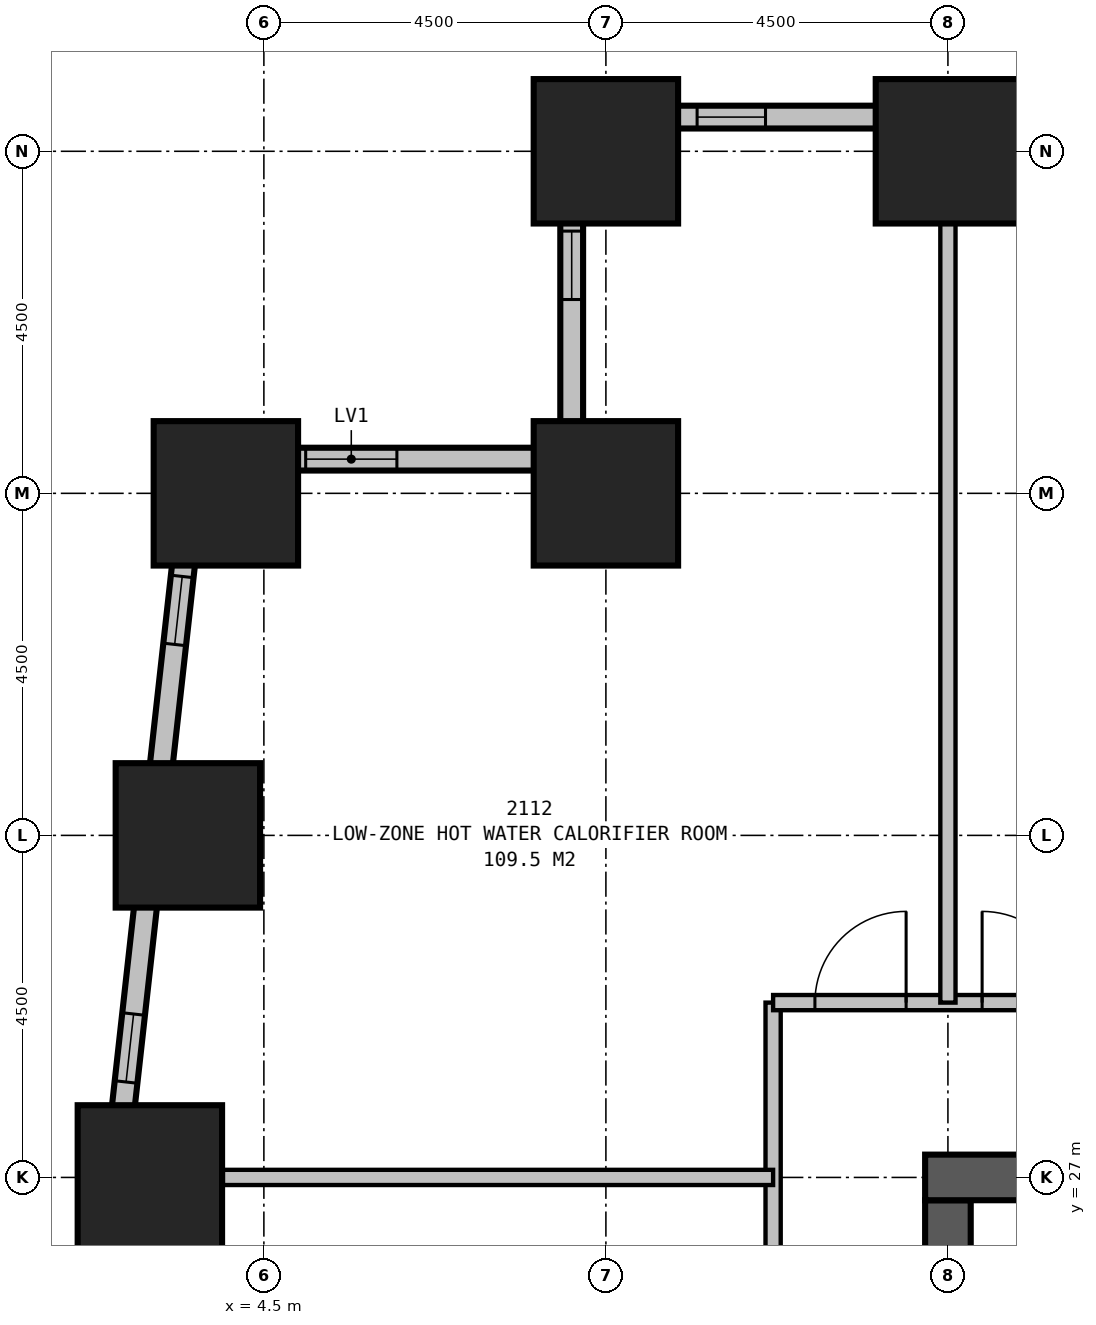
"""IFC4 building model, lengths in metres.
Left out: names, types, materials, properties, quantities, classifications, styles, units other than length and angle.
Written with IfcOpenShell. Run it as: python <this file> out.ifc"""

import sys

from ifc_helpers import new_model, si_unit, direction, frame, frame_2d, origin, origin_2d, place, context, subcontext, project, spatial, rectangle, extrude, element, fill, save


model = new_model("IFC4")
c1 = context("Model", 3, precision=1e-05, world=origin(), true_north=direction((0.0, 1.0)))
c2 = subcontext(c1, "Body", "Model", "MODEL_VIEW")
j1 = project(units=[si_unit("LENGTHUNIT", "METRE"), si_unit("PLANEANGLEUNIT", "RADIAN")], contexts=[c1])
p1 = place(None, origin())
s1 = spatial("IfcSite", under=j1, at=p1, CompositionType="ELEMENT")
p2 = place(p1, origin())
s2 = spatial("IfcBuilding", under=s1, at=p2, CompositionType="ELEMENT")
p3 = place(p2, frame((0.0, 0.0, 85.7)))
s3 = spatial("IfcBuildingStorey", under=s2, at=p3, CompositionType="ELEMENT", Elevation=85.7)
for number, where, z_axis, x_axis in (
    (1, (13.5, 40.5, 0.0), (0.0, 0.0, 1.0), (1.0, 0.0, 0.0)),
    (2, (9.0, 40.5, 0.0), (0.0, 0.0, 1.0), (1.0, 0.0, 0.0)),
    (3, (9.0, 36.0, 0.0), (0.0, 0.0, 1.0), (1.0, 0.0, 0.0)),
    (4, (4.0, 36.0, 0.0), (0.0, 0.0, 1.0), (1.0, 0.0, 0.0)),
    (5, (3.5, 31.5, 0.0), (0.0, 0.0, 1.0), (1.0, 0.0, 0.0)),
    (6, (3.0, 27.0, 0.0), (0.0, 0.0, 1.0), (1.0, 0.0, 0.0)),
):
    element("IfcColumn", number, at=place(p3, frame(where, z_axis=z_axis, x_axis=x_axis)), inside=s3, PredefinedType="COLUMN", context=c2, shape_type="SweptSolid", body=[
        extrude(rectangle(XDim=1.9, YDim=1.9, at=origin_2d()), origin(), (0.0, 0.0, 1.0), 4.2),
    ])
p4 = place(p3, frame((36.3, 27.0, 0.0), z_axis=(0.0, 0.0, 1.0), x_axis=(-1.0, 0.0, 0.0)))
e7 = element("IfcWall", 7, at=p4, inside=s3, PredefinedType="SHEAR", context=c2, shape_type="SweptSolid", body=[
    extrude(rectangle(XDim=23.1, YDim=0.6, at=frame_2d((11.55, 0.0))), origin(), (0.0, 0.0, 1.0), 4.2),
])
p5 = place(p4, frame((17.05, 0.0, 0.0)))
e8 = element("IfcOpeningElement", 8, at=p5, cuts=e7, PredefinedType="OPENING", context=c2, shape_type="SweptSolid", body=[
    extrude(rectangle(XDim=1.0, YDim=2.1, at=frame_2d((0.5, 1.05))), frame((0.0, 0.31, 0.0), z_axis=(0.0, -1.0, 0.0), x_axis=(1.0, 0.0, 0.0)), (0.0, 0.0, 1.0), 0.62),
])
p6 = place(p4, frame((12.05, 0.0, 0.0)))
e9 = element("IfcOpeningElement", 9, at=p6, cuts=e7, PredefinedType="OPENING", context=c2, shape_type="SweptSolid", body=[
    extrude(rectangle(XDim=1.0, YDim=2.1, at=frame_2d((0.5, 1.05))), frame((0.0, 0.31, 0.0), z_axis=(0.0, -1.0, 0.0), x_axis=(1.0, 0.0, 0.0)), (0.0, 0.0, 1.0), 0.62),
])
p7 = place(p4, frame((7.05, 0.0, 0.0)))
e10 = element("IfcOpeningElement", 10, at=p7, cuts=e7, PredefinedType="OPENING", context=c2, shape_type="SweptSolid", body=[
    extrude(rectangle(XDim=1.0, YDim=2.1, at=frame_2d((0.5, 1.05))), frame((0.0, 0.31, 0.0), z_axis=(0.0, -1.0, 0.0), x_axis=(1.0, 0.0, 0.0)), (0.0, 0.0, 1.0), 0.62),
])
p8 = place(p3, frame((13.5, 26.7, 0.0), z_axis=(0.0, 0.0, 1.0), x_axis=(0.0, -1.0, 0.0)))
e11 = element("IfcWall", 11, at=p8, inside=s3, PredefinedType="SHEAR", context=c2, shape_type="SweptSolid", body=[
    extrude(rectangle(XDim=6.7, YDim=0.6, at=frame_2d((3.35, 0.0))), origin(), (0.0, 0.0, 1.0), 4.2),
])
p9 = place(p3, frame((41.1, 40.95, 0.0), z_axis=(0.0, 0.0, 1.0), x_axis=(-1.0, 0.0, 0.0)))
e12 = element("IfcWall", 12, at=p9, inside=s3, PredefinedType="STANDARD", context=c2, shape_type="SweptSolid", body=[
    extrude(rectangle(XDim=32.7, YDim=0.3, at=frame_2d((16.35, 0.0))), origin(), (0.0, 0.0, 1.0), 2.85),
])
p10 = place(p9, frame((3.0, 0.0, 0.5)))
e13 = element("IfcOpeningElement", 13, at=p10, cuts=e12, PredefinedType="OPENING", context=c2, shape_type="SweptSolid", body=[
    extrude(rectangle(XDim=0.9, YDim=1.2, at=frame_2d((0.45, 0.6))), frame((0.0, 0.16, 0.0), z_axis=(0.0, -1.0, 0.0), x_axis=(1.0, 0.0, 0.0)), (0.0, 0.0, 1.0), 0.32),
])
p11 = place(p9, frame((6.15, 0.0, 0.5)))
e14 = element("IfcOpeningElement", 14, at=p11, cuts=e12, PredefinedType="OPENING", context=c2, shape_type="SweptSolid", body=[
    extrude(rectangle(XDim=0.9, YDim=1.2, at=frame_2d((0.45, 0.6))), frame((0.0, 0.16, 0.0), z_axis=(0.0, -1.0, 0.0), x_axis=(1.0, 0.0, 0.0)), (0.0, 0.0, 1.0), 0.32),
])
p12 = place(p9, frame((12.0, 0.0, 0.5)))
e15 = element("IfcOpeningElement", 15, at=p12, cuts=e12, PredefinedType="OPENING", context=c2, shape_type="SweptSolid", body=[
    extrude(rectangle(XDim=0.9, YDim=1.2, at=frame_2d((0.45, 0.6))), frame((0.0, 0.16, 0.0), z_axis=(0.0, -1.0, 0.0), x_axis=(1.0, 0.0, 0.0)), (0.0, 0.0, 1.0), 0.32),
])
p13 = place(p9, frame((15.15, 0.0, 0.5)))
e16 = element("IfcOpeningElement", 16, at=p13, cuts=e12, PredefinedType="OPENING", context=c2, shape_type="SweptSolid", body=[
    extrude(rectangle(XDim=0.9, YDim=1.2, at=frame_2d((0.45, 0.6))), frame((0.0, 0.16, 0.0), z_axis=(0.0, -1.0, 0.0), x_axis=(1.0, 0.0, 0.0)), (0.0, 0.0, 1.0), 0.32),
])
p14 = place(p9, frame((21.0, 0.0, 0.5)))
e17 = element("IfcOpeningElement", 17, at=p14, cuts=e12, PredefinedType="OPENING", context=c2, shape_type="SweptSolid", body=[
    extrude(rectangle(XDim=0.9, YDim=1.2, at=frame_2d((0.45, 0.6))), frame((0.0, 0.16, 0.0), z_axis=(0.0, -1.0, 0.0), x_axis=(1.0, 0.0, 0.0)), (0.0, 0.0, 1.0), 0.32),
])
p15 = place(p9, frame((24.2, 0.0, 0.5)))
e18 = element("IfcOpeningElement", 18, at=p15, cuts=e12, PredefinedType="OPENING", context=c2, shape_type="SweptSolid", body=[
    extrude(rectangle(XDim=0.9, YDim=1.2, at=frame_2d((0.45, 0.6))), frame((0.0, 0.16, 0.0), z_axis=(0.0, -1.0, 0.0), x_axis=(1.0, 0.0, 0.0)), (0.0, 0.0, 1.0), 0.32),
])
p16 = place(p9, frame((30.0, 0.0, 0.5)))
e19 = element("IfcOpeningElement", 19, at=p16, cuts=e12, PredefinedType="OPENING", context=c2, shape_type="SweptSolid", body=[
    extrude(rectangle(XDim=0.9, YDim=1.2, at=frame_2d((0.45, 0.6))), frame((0.0, 0.16, 0.0), z_axis=(0.0, -1.0, 0.0), x_axis=(1.0, 0.0, 0.0)), (0.0, 0.0, 1.0), 0.32),
])
p17 = place(p3, frame((8.55, 41.1, 0.0), z_axis=(0.0, 0.0, 1.0), x_axis=(0.0, -1.0, 0.0)))
e20 = element("IfcWall", 20, at=p17, inside=s3, PredefinedType="STANDARD", context=c2, shape_type="SweptSolid", body=[
    extrude(rectangle(XDim=4.8, YDim=0.3, at=frame_2d((2.4, 0.0))), origin(), (0.0, 0.0, 1.0), 2.85),
])
p18 = place(p17, frame((1.65, 0.0, 0.5)))
e21 = element("IfcOpeningElement", 21, at=p18, cuts=e20, PredefinedType="OPENING", context=c2, shape_type="SweptSolid", body=[
    extrude(rectangle(XDim=0.9, YDim=1.2, at=frame_2d((0.45, 0.6))), frame((0.0, 0.16, 0.0), z_axis=(0.0, -1.0, 0.0), x_axis=(1.0, 0.0, 0.0)), (0.0, 0.0, 1.0), 0.32),
])
p19 = place(p3, frame((8.7, 36.45, 0.0), z_axis=(0.0, 0.0, 1.0), x_axis=(-1.0, 0.0, 0.0)))
e22 = element("IfcWall", 22, at=p19, inside=s3, PredefinedType="STANDARD", context=c2, shape_type="SweptSolid", body=[
    extrude(rectangle(XDim=5.253, YDim=0.3, at=frame_2d((2.626, 0.0))), origin(), (0.0, 0.0, 1.0), 2.85),
])
p20 = place(p19, frame((2.45, 0.0, 0.3)))
e23 = element("IfcOpeningElement", 23, at=p20, cuts=e22, PredefinedType="OPENING", context=c2, shape_type="SweptSolid", body=[
    extrude(rectangle(XDim=1.2, YDim=1.5, at=frame_2d((0.6, 0.75))), frame((0.0, 0.16, 0.0), z_axis=(0.0, -1.0, 0.0), x_axis=(1.0, 0.0, 0.0)), (0.0, 0.0, 1.0), 0.32),
])
p21 = place(p3, frame((3.614, 36.599, 0.0), z_axis=(0.0, 0.0, 1.0), x_axis=(-0.110429082637, -0.993884006164, 0.0)))
e24 = element("IfcWall", 24, at=p21, inside=s3, PredefinedType="STANDARD", context=c2, shape_type="SweptSolid", body=[
    extrude(rectangle(XDim=32.899, YDim=0.3, at=frame_2d((16.45, 0.0))), origin(), (0.0, 0.0, 1.0), 2.85),
])
p22 = place(p21, frame((1.703, 0.0, 0.5)))
e25 = element("IfcOpeningElement", 25, at=p22, cuts=e24, PredefinedType="OPENING", context=c2, shape_type="SweptSolid", body=[
    extrude(rectangle(XDim=0.9, YDim=1.2, at=frame_2d((0.45, 0.6))), frame((0.0, 0.16, 0.0), z_axis=(0.0, -1.0, 0.0), x_axis=(1.0, 0.0, 0.0)), (0.0, 0.0, 1.0), 0.32),
])
p23 = place(p21, frame((7.495, 0.0, 0.5)))
e26 = element("IfcOpeningElement", 26, at=p23, cuts=e24, PredefinedType="OPENING", context=c2, shape_type="SweptSolid", body=[
    extrude(rectangle(XDim=0.9, YDim=1.2, at=frame_2d((0.45, 0.6))), frame((0.0, 0.16, 0.0), z_axis=(0.0, -1.0, 0.0), x_axis=(1.0, 0.0, 0.0)), (0.0, 0.0, 1.0), 0.32),
])
p24 = place(p21, frame((10.758, 0.0, 0.5)))
e27 = element("IfcOpeningElement", 27, at=p24, cuts=e24, PredefinedType="OPENING", context=c2, shape_type="SweptSolid", body=[
    extrude(rectangle(XDim=0.9, YDim=1.2, at=frame_2d((0.45, 0.6))), frame((0.0, 0.16, 0.0), z_axis=(0.0, -1.0, 0.0), x_axis=(1.0, 0.0, 0.0)), (0.0, 0.0, 1.0), 0.32),
])
p25 = place(p21, frame((16.55, 0.0, 0.5)))
e28 = element("IfcOpeningElement", 28, at=p25, cuts=e24, PredefinedType="OPENING", context=c2, shape_type="SweptSolid", body=[
    extrude(rectangle(XDim=0.9, YDim=1.2, at=frame_2d((0.45, 0.6))), frame((0.0, 0.16, 0.0), z_axis=(0.0, -1.0, 0.0), x_axis=(1.0, 0.0, 0.0)), (0.0, 0.0, 1.0), 0.32),
])
p26 = place(p21, frame((19.814, 0.0, 0.5)))
e29 = element("IfcOpeningElement", 29, at=p26, cuts=e24, PredefinedType="OPENING", context=c2, shape_type="SweptSolid", body=[
    extrude(rectangle(XDim=0.9, YDim=1.2, at=frame_2d((0.45, 0.6))), frame((0.0, 0.16, 0.0), z_axis=(0.0, -1.0, 0.0), x_axis=(1.0, 0.0, 0.0)), (0.0, 0.0, 1.0), 0.32),
])
p27 = place(p21, frame((25.605, 0.0, 0.5)))
e30 = element("IfcOpeningElement", 30, at=p27, cuts=e24, PredefinedType="OPENING", context=c2, shape_type="SweptSolid", body=[
    extrude(rectangle(XDim=0.9, YDim=1.2, at=frame_2d((0.45, 0.6))), frame((0.0, 0.16, 0.0), z_axis=(0.0, -1.0, 0.0), x_axis=(1.0, 0.0, 0.0)), (0.0, 0.0, 1.0), 0.32),
])
p28 = place(p21, frame((28.869, 0.0, 0.5)))
e31 = element("IfcOpeningElement", 31, at=p28, cuts=e24, PredefinedType="OPENING", context=c2, shape_type="SweptSolid", body=[
    extrude(rectangle(XDim=0.9, YDim=1.2, at=frame_2d((0.45, 0.6))), frame((0.0, 0.16, 0.0), z_axis=(0.0, -1.0, 0.0), x_axis=(1.0, 0.0, 0.0)), (0.0, 0.0, 1.0), 0.32),
])
p29 = place(p3, frame((11.2, 29.3, 0.0), z_axis=(0.0, 0.0, 1.0), x_axis=(1.0, 0.0, 0.0)))
e32 = element("IfcWall", 32, at=p29, inside=s3, PredefinedType="PARTITIONING", context=c2, shape_type="SweptSolid", body=[
    extrude(rectangle(XDim=27.1, YDim=0.2, at=frame_2d((13.55, 0.0))), origin(), (0.0, 0.0, 1.0), 3.95),
])
p30 = place(p29, frame((2.75, 0.0, 0.0)))
e33 = element("IfcOpeningElement", 33, at=p30, cuts=e32, PredefinedType="OPENING", context=c2, shape_type="SweptSolid", body=[
    extrude(rectangle(XDim=1.2, YDim=2.1, at=frame_2d((0.6, 1.05))), frame((0.0, 0.11, 0.0), z_axis=(0.0, -1.0, 0.0), x_axis=(1.0, 0.0, 0.0)), (0.0, 0.0, 1.0), 0.22),
])
p31 = place(p29, frame((16.25, 0.0, 0.0)))
e34 = element("IfcOpeningElement", 34, at=p31, cuts=e32, PredefinedType="OPENING", context=c2, shape_type="SweptSolid", body=[
    extrude(rectangle(XDim=1.2, YDim=2.1, at=frame_2d((0.6, 1.05))), frame((0.0, 0.11, 0.0), z_axis=(0.0, -1.0, 0.0), x_axis=(1.0, 0.0, 0.0)), (0.0, 0.0, 1.0), 0.22),
])
p32 = place(p29, frame((0.55, 0.0, 0.0)))
e35 = element("IfcOpeningElement", 35, at=p32, cuts=e32, PredefinedType="OPENING", context=c2, shape_type="SweptSolid", body=[
    extrude(rectangle(XDim=1.2, YDim=2.1, at=frame_2d((0.6, 1.05))), frame((0.0, 0.11, 0.0), z_axis=(0.0, -1.0, 0.0), x_axis=(1.0, 0.0, 0.0)), (0.0, 0.0, 1.0), 0.22),
])
p33 = place(p29, frame((25.35, 0.0, 0.0)))
e36 = element("IfcOpeningElement", 36, at=p33, cuts=e32, PredefinedType="OPENING", context=c2, shape_type="SweptSolid", body=[
    extrude(rectangle(XDim=1.2, YDim=2.1, at=frame_2d((0.6, 1.05))), frame((0.0, 0.11, 0.0), z_axis=(0.0, -1.0, 0.0), x_axis=(1.0, 0.0, 0.0)), (0.0, 0.0, 1.0), 0.22),
])
p34 = place(p3, frame((11.2, 11.2, 0.0), z_axis=(0.0, 0.0, 1.0), x_axis=(0.0, 1.0, 0.0)))
e37 = element("IfcWall", 37, at=p34, inside=s3, PredefinedType="PARTITIONING", context=c2, shape_type="SweptSolid", body=[
    extrude(rectangle(XDim=18.1, YDim=0.2, at=frame_2d((9.05, 0.0))), origin(), (0.0, 0.0, 1.0), 3.95),
])
p35 = place(p34, frame((2.75, 0.0, 0.0)))
e38 = element("IfcOpeningElement", 38, at=p35, cuts=e37, PredefinedType="OPENING", context=c2, shape_type="SweptSolid", body=[
    extrude(rectangle(XDim=1.2, YDim=2.1, at=frame_2d((0.6, 1.05))), frame((0.0, 0.11, 0.0), z_axis=(0.0, -1.0, 0.0), x_axis=(1.0, 0.0, 0.0)), (0.0, 0.0, 1.0), 0.22),
])
p36 = place(p34, frame((11.75, 0.0, 0.0)))
e39 = element("IfcOpeningElement", 39, at=p36, cuts=e37, PredefinedType="OPENING", context=c2, shape_type="SweptSolid", body=[
    extrude(rectangle(XDim=1.0, YDim=2.1, at=frame_2d((0.5, 1.05))), frame((0.0, 0.11, 0.0), z_axis=(0.0, -1.0, 0.0), x_axis=(1.0, 0.0, 0.0)), (0.0, 0.0, 1.0), 0.22),
])
p37 = place(p3, frame((13.5, 29.3, 0.0), z_axis=(0.0, 0.0, 1.0), x_axis=(0.0, 1.0, 0.0)))
e40 = element("IfcWall", 40, at=p37, inside=s3, PredefinedType="PARTITIONING", context=c2, shape_type="SweptSolid", body=[
    extrude(rectangle(XDim=10.25, YDim=0.2, at=frame_2d((5.125, 0.0))), origin(), (0.0, 0.0, 1.0), 2.95),
])
p38 = place(p3, frame((11.2, 27.0, 0.0), z_axis=(0.0, 0.0, 1.0), x_axis=(-1.0, 0.0, 0.0)))
e41 = element("IfcWall", 41, at=p38, inside=s3, PredefinedType="PARTITIONING", context=c2, shape_type="SweptSolid", body=[
    extrude(rectangle(XDim=7.239, YDim=0.2, at=frame_2d((3.62, 0.0))), origin(), (0.0, 0.0, 1.0), 2.65),
])
p39 = place(p16, origin())
e42 = element("IfcWindow", 42, at=p39, inside=s3, PartitioningType="SINGLE_PANEL", PredefinedType="USERDEFINED", context=c2, shape_type="SweptSolid", body=[
    extrude(rectangle(XDim=0.9, YDim=1.2, at=frame_2d((0.45, 0.6))), frame((0.0, 0.03, 0.0), z_axis=(0.0, -1.0, 0.0), x_axis=(1.0, 0.0, 0.0)), (0.0, 0.0, 1.0), 0.06),
])
fill(e19, e42)
p40 = place(p18, origin())
e43 = element("IfcWindow", 43, at=p40, inside=s3, PartitioningType="SINGLE_PANEL", PredefinedType="USERDEFINED", context=c2, shape_type="SweptSolid", body=[
    extrude(rectangle(XDim=0.9, YDim=1.2, at=frame_2d((0.45, 0.6))), frame((0.0, 0.03, 0.0), z_axis=(0.0, -1.0, 0.0), x_axis=(1.0, 0.0, 0.0)), (0.0, 0.0, 1.0), 0.06),
])
fill(e21, e43)
p41 = place(p20, origin())
e44 = element("IfcWindow", 44, at=p41, inside=s3, PartitioningType="SINGLE_PANEL", PredefinedType="USERDEFINED", context=c2, shape_type="SweptSolid", body=[
    extrude(rectangle(XDim=1.2, YDim=1.5, at=frame_2d((0.6, 0.75))), frame((0.0, 0.03, 0.0), z_axis=(0.0, -1.0, 0.0), x_axis=(1.0, 0.0, 0.0)), (0.0, 0.0, 1.0), 0.06),
])
fill(e23, e44)
p42 = place(p22, origin())
e45 = element("IfcWindow", 45, at=p42, inside=s3, PartitioningType="SINGLE_PANEL", PredefinedType="USERDEFINED", context=c2, shape_type="SweptSolid", body=[
    extrude(rectangle(XDim=0.9, YDim=1.2, at=frame_2d((0.45, 0.6))), frame((0.0, 0.03, 0.0), z_axis=(0.0, -1.0, 0.0), x_axis=(1.0, 0.0, 0.0)), (0.0, 0.0, 1.0), 0.06),
])
fill(e25, e45)
p43 = place(p23, origin())
e46 = element("IfcWindow", 46, at=p43, inside=s3, PartitioningType="SINGLE_PANEL", PredefinedType="USERDEFINED", context=c2, shape_type="SweptSolid", body=[
    extrude(rectangle(XDim=0.9, YDim=1.2, at=frame_2d((0.45, 0.6))), frame((0.0, 0.03, 0.0), z_axis=(0.0, -1.0, 0.0), x_axis=(1.0, 0.0, 0.0)), (0.0, 0.0, 1.0), 0.06),
])
fill(e26, e46)
p44 = place(p30, origin())
e47 = element("IfcDoor", 47, at=p44, inside=s3, OperationType="SINGLE_SWING_LEFT", PredefinedType="DOOR", context=c2, shape_type="SweptSolid", body=[
    extrude(rectangle(XDim=1.2, YDim=2.1, at=frame_2d((0.6, 1.05))), frame((0.0, 0.025, 0.0), z_axis=(0.0, -1.0, 0.0), x_axis=(1.0, 0.0, 0.0)), (0.0, 0.0, 1.0), 0.05),
])
fill(e33, e47)
p45 = place(p32, origin())
e48 = element("IfcDoor", 48, at=p45, inside=s3, OperationType="SINGLE_SWING_RIGHT", PredefinedType="DOOR", context=c2, shape_type="SweptSolid", body=[
    extrude(rectangle(XDim=1.2, YDim=2.1, at=frame_2d((0.6, 1.05))), frame((0.0, 0.025, 0.0), z_axis=(0.0, -1.0, 0.0), x_axis=(1.0, 0.0, 0.0)), (0.0, 0.0, 1.0), 0.05),
])
fill(e35, e48)
save(model, sys.argv[1])
